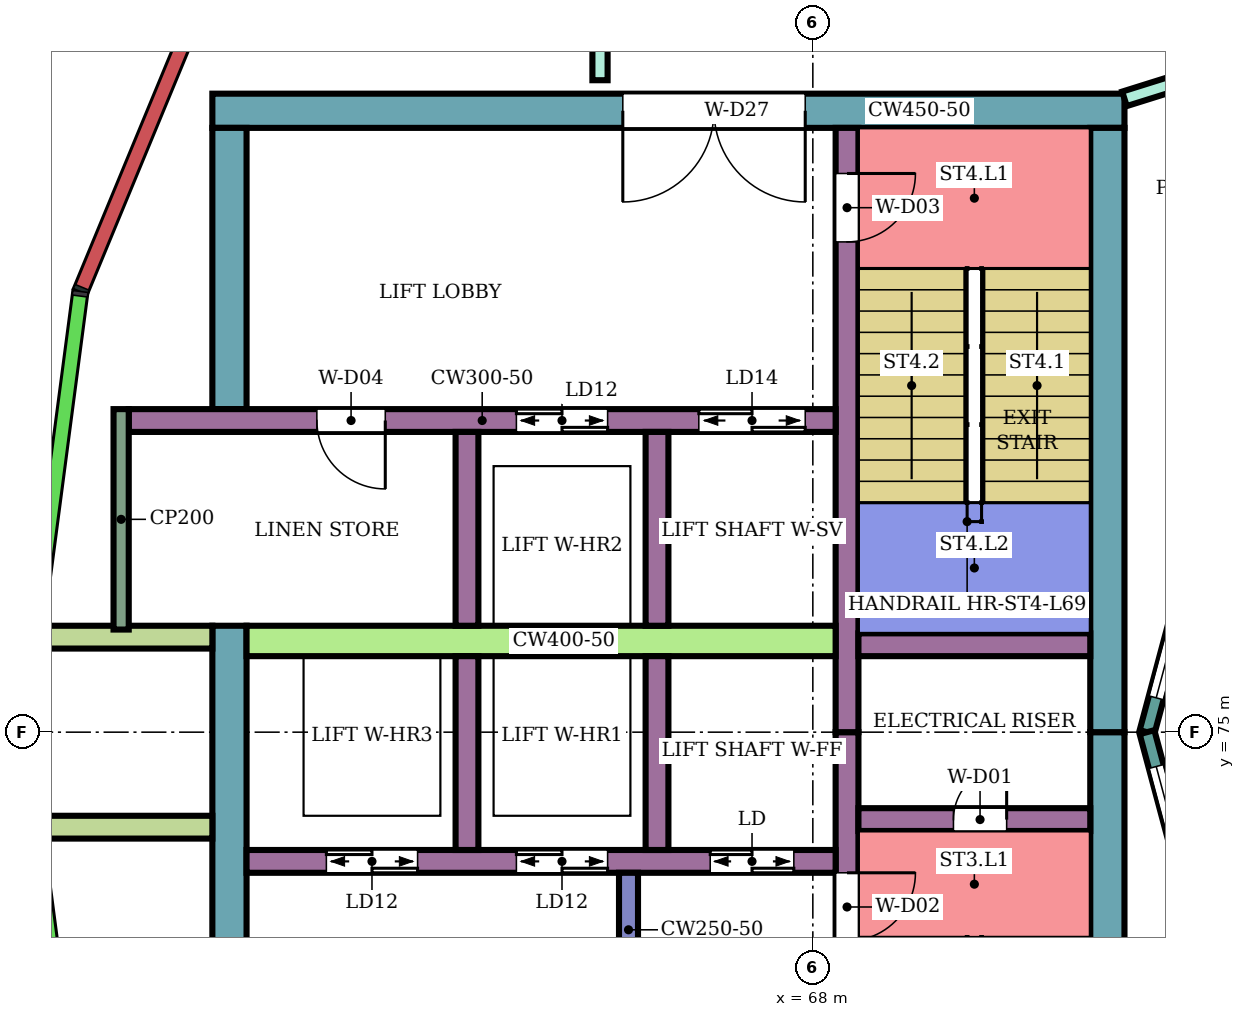
"""IFC4 building model, lengths in metres.
Left out: names, types, materials, properties, quantities, classifications, styles, units other than length and angle.
Written with IfcOpenShell. Run it as: python <this file> out.ifc"""

import sys

from ifc_helpers import new_model, si_unit, direction, frame, frame_2d, origin, place, context, subcontext, project, spatial, rectangle, extrude, element, fill, save


model = new_model("IFC4")
c1 = context("Model", 3, precision=1e-05, world=origin(), true_north=direction((0.0, 1.0)))
c2 = subcontext(c1, "Body", "Model", "MODEL_VIEW")
j1 = project(units=[si_unit("LENGTHUNIT", "METRE"), si_unit("PLANEANGLEUNIT", "RADIAN")], contexts=[c1])
p1 = place(None, origin())
s1 = spatial("IfcSite", under=j1, at=p1, CompositionType="ELEMENT")
p2 = place(p1, origin())
s2 = spatial("IfcBuilding", under=s1, at=p2, CompositionType="ELEMENT")
p3 = place(p2, frame((0.0, 0.0, 300.9)))
s3 = spatial("IfcBuildingStorey", under=s2, at=p3, CompositionType="ELEMENT", Elevation=300.9)
p4 = place(p3, frame((72.1, 83.175, 0.0), z_axis=(0.0, 0.0, 1.0), x_axis=(-1.0, 0.0, 0.0)))
e1 = element("IfcWall", 1, at=p4, inside=s3, PredefinedType="SHEAR", context=c2, shape_type="SweptSolid", body=[
    extrude(rectangle(XDim=12.0, YDim=0.45, at=frame_2d((6.0, 0.0))), origin(), (0.0, 0.0, 1.0), 3.88),
])
p5 = place(p4, frame((4.2, 0.0, 0.0)))
e2 = element("IfcOpeningElement", 2, at=p5, cuts=e1, PredefinedType="OPENING", context=c2, shape_type="SweptSolid", body=[
    extrude(rectangle(XDim=2.4, YDim=2.4, at=frame_2d((1.2, 1.2))), frame((0.0, 0.235, 0.0), z_axis=(0.0, -1.0, 0.0), x_axis=(1.0, 0.0, 0.0)), (0.0, 0.0, 1.0), 0.47),
])
for number, where, z_axis, x_axis in (
    (3, (71.875, 75.0, 0.0), (0.0, 0.0, 1.0), (0.0, -1.0, 0.0)),
    (4, (71.875, 82.95, 0.0), (0.0, 0.0, 1.0), (0.0, -1.0, 0.0)),
):
    element("IfcWall", number, at=place(p3, frame(where, z_axis=z_axis, x_axis=x_axis)), inside=s3, PredefinedType="SHEAR", context=c2, shape_type="SweptSolid", body=[
        extrude(rectangle(XDim=7.95, YDim=0.45, at=frame_2d((3.975, 0.0))), origin(), (0.0, 0.0, 1.0), 3.88),
    ])
p6 = place(p3, frame((60.325, 76.4, 0.0), z_axis=(0.0, 0.0, 1.0), x_axis=(0.0, -1.0, 0.0)))
e5 = element("IfcWall", 5, at=p6, inside=s3, PredefinedType="SHEAR", context=c2, shape_type="SweptSolid", body=[
    extrude(rectangle(XDim=9.35, YDim=0.45, at=frame_2d((4.675, 0.0))), origin(), (0.0, 0.0, 1.0), 3.88),
])
p7 = place(p3, frame((60.325, 82.95, 0.0), z_axis=(0.0, 0.0, 1.0), x_axis=(0.0, -1.0, 0.0)))
e6 = element("IfcWall", 6, at=p7, inside=s3, PredefinedType="SHEAR", context=c2, shape_type="SweptSolid", body=[
    extrude(rectangle(XDim=3.7, YDim=0.45, at=frame_2d((1.85, 0.0))), origin(), (0.0, 0.0, 1.0), 3.88),
])
p8 = place(p3, frame((68.45, 75.0, 0.0), z_axis=(0.0, 0.0, 1.0), x_axis=(0.0, -1.0, 0.0)))
e7 = element("IfcWall", 7, at=p8, inside=s3, PredefinedType="SHEAR", context=c2, shape_type="SweptSolid", body=[
    extrude(rectangle(XDim=7.95, YDim=0.3, at=frame_2d((3.975, 0.0))), origin(), (0.0, 0.0, 1.0), 3.88),
])
p9 = place(p8, frame((1.85, 0.0, 0.0)))
e8 = element("IfcOpeningElement", 8, at=p9, cuts=e7, PredefinedType="OPENING", context=c2, shape_type="SweptSolid", body=[
    extrude(rectangle(XDim=0.9, YDim=2.1, at=frame_2d((0.45, 1.05))), frame((0.0, 0.16, 0.0), z_axis=(0.0, -1.0, 0.0), x_axis=(1.0, 0.0, 0.0)), (0.0, 0.0, 1.0), 0.32),
])
p10 = place(p3, frame((68.45, 82.95, 0.0), z_axis=(0.0, 0.0, 1.0), x_axis=(0.0, -1.0, 0.0)))
e9 = element("IfcWall", 9, at=p10, inside=s3, PredefinedType="SHEAR", context=c2, shape_type="SweptSolid", body=[
    extrude(rectangle(XDim=7.95, YDim=0.3, at=frame_2d((3.975, 0.0))), origin(), (0.0, 0.0, 1.0), 3.88),
])
p11 = place(p10, frame((0.6, 0.0, 0.0)))
e10 = element("IfcOpeningElement", 10, at=p11, cuts=e9, PredefinedType="OPENING", context=c2, shape_type="SweptSolid", body=[
    extrude(rectangle(XDim=0.9, YDim=2.1, at=frame_2d((0.45, 1.05))), frame((0.0, 0.16, 0.0), z_axis=(0.0, -1.0, 0.0), x_axis=(1.0, 0.0, 0.0)), (0.0, 0.0, 1.0), 0.32),
])
p12 = place(p3, frame((71.65, 73.85, 0.0), z_axis=(0.0, 0.0, 1.0), x_axis=(-1.0, 0.0, 0.0)))
e11 = element("IfcWall", 11, at=p12, inside=s3, PredefinedType="SHEAR", context=c2, shape_type="SweptSolid", body=[
    extrude(rectangle(XDim=3.05, YDim=0.3, at=frame_2d((1.525, 0.0))), origin(), (0.0, 0.0, 1.0), 3.88),
])
p13 = place(p12, frame((1.1, 0.0, 0.0)))
e12 = element("IfcOpeningElement", 12, at=p13, cuts=e11, PredefinedType="OPENING", context=c2, shape_type="SweptSolid", body=[
    extrude(rectangle(XDim=0.7, YDim=2.0, at=frame_2d((0.35, 1.0))), frame((0.0, 0.16, 0.0), z_axis=(0.0, -1.0, 0.0), x_axis=(1.0, 0.0, 0.0)), (0.0, 0.0, 1.0), 0.32),
])
p14 = place(p3, frame((71.65, 76.15, 0.0), z_axis=(0.0, 0.0, 1.0), x_axis=(-1.0, 0.0, 0.0)))
e13 = element("IfcWall", 13, at=p14, inside=s3, PredefinedType="SHEAR", context=c2, shape_type="SweptSolid", body=[
    extrude(rectangle(XDim=3.05, YDim=0.3, at=frame_2d((1.525, 0.0))), origin(), (0.0, 0.0, 1.0), 3.88),
])
p15 = place(p3, frame((68.3, 73.3, 0.0), z_axis=(0.0, 0.0, 1.0), x_axis=(-1.0, 0.0, 0.0)))
e14 = element("IfcWall", 14, at=p15, inside=s3, PredefinedType="SHEAR", context=c2, shape_type="SweptSolid", body=[
    extrude(rectangle(XDim=7.75, YDim=0.3, at=frame_2d((3.875, 0.0))), origin(), (0.0, 0.0, 1.0), 3.88),
])
p16 = place(p15, frame((0.55, 0.0, 0.0)))
e15 = element("IfcOpeningElement", 15, at=p16, cuts=e14, PredefinedType="OPENING", context=c2, shape_type="SweptSolid", body=[
    extrude(rectangle(XDim=1.1, YDim=2.1, at=frame_2d((0.55, 1.05))), frame((0.0, 0.16, 0.0), z_axis=(0.0, -1.0, 0.0), x_axis=(1.0, 0.0, 0.0)), (0.0, 0.0, 1.0), 0.32),
])
p17 = place(p15, frame((3.0, 0.0, 0.0)))
e16 = element("IfcOpeningElement", 16, at=p17, cuts=e14, PredefinedType="OPENING", context=c2, shape_type="SweptSolid", body=[
    extrude(rectangle(XDim=1.2, YDim=2.1, at=frame_2d((0.6, 1.05))), frame((0.0, 0.16, 0.0), z_axis=(0.0, -1.0, 0.0), x_axis=(1.0, 0.0, 0.0)), (0.0, 0.0, 1.0), 0.32),
])
p18 = place(p15, frame((5.5, 0.0, 0.0)))
e17 = element("IfcOpeningElement", 17, at=p18, cuts=e14, PredefinedType="OPENING", context=c2, shape_type="SweptSolid", body=[
    extrude(rectangle(XDim=1.2, YDim=2.1, at=frame_2d((0.6, 1.05))), frame((0.0, 0.16, 0.0), z_axis=(0.0, -1.0, 0.0), x_axis=(1.0, 0.0, 0.0)), (0.0, 0.0, 1.0), 0.32),
])
p19 = place(p3, frame((68.3, 76.2, 0.0), z_axis=(0.0, 0.0, 1.0), x_axis=(-1.0, 0.0, 0.0)))
e18 = element("IfcWall", 18, at=p19, inside=s3, PredefinedType="SHEAR", context=c2, shape_type="SweptSolid", body=[
    extrude(rectangle(XDim=7.75, YDim=0.4, at=frame_2d((3.875, 0.0))), origin(), (0.0, 0.0, 1.0), 3.88),
])
p20 = place(p3, frame((68.3, 79.1, 0.0), z_axis=(0.0, 0.0, 1.0), x_axis=(-1.0, 0.0, 0.0)))
e19 = element("IfcWall", 19, at=p20, inside=s3, PredefinedType="SHEAR", context=c2, shape_type="SweptSolid", body=[
    extrude(rectangle(XDim=9.3, YDim=0.3, at=frame_2d((4.65, 0.0))), origin(), (0.0, 0.0, 1.0), 3.88),
])
p21 = place(p20, frame((0.4, 0.0, 0.0)))
e20 = element("IfcOpeningElement", 20, at=p21, cuts=e19, PredefinedType="OPENING", context=c2, shape_type="SweptSolid", body=[
    extrude(rectangle(XDim=1.4, YDim=2.1, at=frame_2d((0.7, 1.05))), frame((0.0, 0.16, 0.0), z_axis=(0.0, -1.0, 0.0), x_axis=(1.0, 0.0, 0.0)), (0.0, 0.0, 1.0), 0.32),
])
p22 = place(p20, frame((3.0, 0.0, 0.0)))
e21 = element("IfcOpeningElement", 21, at=p22, cuts=e19, PredefinedType="OPENING", context=c2, shape_type="SweptSolid", body=[
    extrude(rectangle(XDim=1.2, YDim=2.1, at=frame_2d((0.6, 1.05))), frame((0.0, 0.16, 0.0), z_axis=(0.0, -1.0, 0.0), x_axis=(1.0, 0.0, 0.0)), (0.0, 0.0, 1.0), 0.32),
])
p23 = place(p20, frame((5.925, 0.0, 0.0)))
e22 = element("IfcOpeningElement", 22, at=p23, cuts=e19, PredefinedType="OPENING", context=c2, shape_type="SweptSolid", body=[
    extrude(rectangle(XDim=0.9, YDim=2.1, at=frame_2d((0.45, 1.05))), frame((0.0, 0.16, 0.0), z_axis=(0.0, -1.0, 0.0), x_axis=(1.0, 0.0, 0.0)), (0.0, 0.0, 1.0), 0.32),
])
for number, where, z_axis, x_axis in (
    (23, (65.95, 76.0, 0.0), (0.0, 0.0, 1.0), (0.0, -1.0, 0.0)),
    (24, (63.45, 76.0, 0.0), (0.0, 0.0, 1.0), (0.0, -1.0, 0.0)),
    (25, (65.95, 78.95, 0.0), (0.0, 0.0, 1.0), (0.0, -1.0, 0.0)),
    (26, (63.45, 78.95, 0.0), (0.0, 0.0, 1.0), (0.0, -1.0, 0.0)),
):
    element("IfcWall", number, at=place(p3, frame(where, z_axis=z_axis, x_axis=x_axis)), inside=s3, PredefinedType="SHEAR", context=c2, shape_type="SweptSolid", body=[
        extrude(rectangle(XDim=2.55, YDim=0.3, at=frame_2d((1.275, 0.0))), origin(), (0.0, 0.0, 1.0), 3.88),
    ])
p24 = place(p3, frame((65.575, 73.15, 0.0), z_axis=(0.0, 0.0, 1.0), x_axis=(0.0, -1.0, 0.0)))
e27 = element("IfcWall", 27, at=p24, inside=s3, PredefinedType="SHEAR", context=c2, shape_type="SweptSolid", body=[
    extrude(rectangle(XDim=1.5, YDim=0.25, at=frame_2d((0.75, 0.0))), origin(), (0.0, 0.0, 1.0), 3.88),
])
for number, where, z_axis, x_axis in (
    (28, (60.1, 76.25, 0.0), (0.0, 0.0, 1.0), (-1.0, 0.0, 0.0)),
    (29, (60.1, 73.75, 0.0), (0.0, 0.0, 1.0), (-1.0, 0.0, 0.0)),
):
    element("IfcWall", number, at=place(p3, frame(where, z_axis=z_axis, x_axis=x_axis)), inside=s3, PredefinedType="NOTDEFINED", context=c2, shape_type="SweptSolid", body=[
        extrude(rectangle(XDim=2.416, YDim=0.3, at=frame_2d((1.208, 0.0))), origin(), (0.0, 0.0, 1.0), 4.2),
    ])
p25 = place(p3, frame((73.415, 78.802, 0.0), z_axis=(0.0, 0.0, 1.0), x_axis=(-0.258789828301, -0.965933654434, 0.0)))
e30 = element("IfcWall", 30, at=p25, inside=s3, PredefinedType="NOTDEFINED", context=c2, shape_type="SweptSolid", body=[
    extrude(rectangle(XDim=3.936, YDim=0.2, at=frame_2d((1.968, 0.0))), origin(), (0.0, 0.0, 1.0), 4.2),
])
p26 = place(p25, frame((0.468, 0.0, 0.9)))
e31 = element("IfcOpeningElement", 31, at=p26, cuts=e30, PredefinedType="OPENING", context=c2, shape_type="SweptSolid", body=[
    extrude(rectangle(XDim=3.0, YDim=2.3, at=frame_2d((1.5, 1.15))), frame((0.0, 0.11, 0.0), z_axis=(0.0, -1.0, 0.0), x_axis=(1.0, 0.0, 0.0)), (0.0, 0.0, 1.0), 0.22),
])
p27 = place(p3, frame((72.396, 75.0, 0.0), z_axis=(0.0, 0.0, 1.0), x_axis=(0.258789828301, -0.965933654434, 0.0)))
e32 = element("IfcWall", 32, at=p27, inside=s3, PredefinedType="NOTDEFINED", context=c2, shape_type="SweptSolid", body=[
    extrude(rectangle(XDim=3.936, YDim=0.2, at=frame_2d((1.968, 0.0))), origin(), (0.0, 0.0, 1.0), 4.2),
])
p28 = place(p27, frame((0.468, 0.0, 0.9)))
e33 = element("IfcOpeningElement", 33, at=p28, cuts=e32, PredefinedType="OPENING", context=c2, shape_type="SweptSolid", body=[
    extrude(rectangle(XDim=3.0, YDim=2.3, at=frame_2d((1.5, 1.15))), frame((0.0, 0.11, 0.0), z_axis=(0.0, -1.0, 0.0), x_axis=(1.0, 0.0, 0.0)), (0.0, 0.0, 1.0), 0.22),
])
p29 = place(p3, frame((65.2, 83.577, 0.0), z_axis=(0.0, 0.0, 1.0), x_axis=(0.0, 1.0, 0.0)))
e34 = element("IfcWall", 34, at=p29, inside=s3, PredefinedType="PARTITIONING", context=c2, shape_type="SweptSolid", body=[
    extrude(rectangle(XDim=1.223, YDim=0.2, at=frame_2d((0.612, 0.0))), origin(), (0.0, 0.0, 1.0), 3.75),
])
p30 = place(p3, frame((72.1, 83.332, 0.0), z_axis=(0.0, 0.0, 1.0), x_axis=(0.954233106619, 0.299063836383, 0.0)))
e35 = element("IfcWall", 35, at=p30, inside=s3, PredefinedType="PARTITIONING", context=c2, shape_type="SweptSolid", body=[
    extrude(rectangle(XDim=2.414, YDim=0.2, at=frame_2d((1.207, 0.0))), origin(), (0.0, 0.0, 1.0), 3.75),
])
p31 = place(p30, frame((0.762, 0.0, 0.0)))
e36 = element("IfcOpeningElement", 36, at=p31, cuts=e35, PredefinedType="OPENING", context=c2, shape_type="SweptSolid", body=[
    extrude(rectangle(XDim=0.9, YDim=2.1, at=frame_2d((0.45, 1.05))), frame((0.0, 0.11, 0.0), z_axis=(0.0, -1.0, 0.0), x_axis=(1.0, 0.0, 0.0)), (0.0, 0.0, 1.0), 0.22),
])
p32 = place(p3, frame((58.9, 79.25, 0.0), z_axis=(0.0, 0.0, 1.0), x_axis=(0.0, -1.0, 0.0)))
e37 = element("IfcWall", 37, at=p32, inside=s3, PredefinedType="PARTITIONING", context=c2, shape_type="SweptSolid", body=[
    extrude(rectangle(XDim=2.9, YDim=0.2, at=frame_2d((1.45, 0.0))), origin(), (0.0, 0.0, 1.0), 3.88),
])
p33 = place(p26, origin())
e38 = element("IfcWindow", 38, at=p33, inside=s3, PartitioningType="SINGLE_PANEL", PredefinedType="WINDOW", context=c2, shape_type="SweptSolid", body=[
    extrude(rectangle(XDim=3.0, YDim=2.3, at=frame_2d((1.5, 1.15))), frame((0.0, 0.03, 0.0), z_axis=(0.0, -1.0, 0.0), x_axis=(1.0, 0.0, 0.0)), (0.0, 0.0, 1.0), 0.06),
])
fill(e31, e38)
p34 = place(p28, origin())
e39 = element("IfcWindow", 39, at=p34, inside=s3, PartitioningType="SINGLE_PANEL", PredefinedType="WINDOW", context=c2, shape_type="SweptSolid", body=[
    extrude(rectangle(XDim=3.0, YDim=2.3, at=frame_2d((1.5, 1.15))), frame((0.0, 0.03, 0.0), z_axis=(0.0, -1.0, 0.0), x_axis=(1.0, 0.0, 0.0)), (0.0, 0.0, 1.0), 0.06),
])
fill(e33, e39)
p35 = place(p13, frame((0.7, 0.0, 0.0), z_axis=(0.0, 0.0, 1.0), x_axis=(-1.0, 0.0, 0.0)))
e40 = element("IfcDoor", 40, at=p35, inside=s3, OperationType="SINGLE_SWING_RIGHT", PredefinedType="DOOR", context=c2, shape_type="SweptSolid", body=[
    extrude(rectangle(XDim=0.7, YDim=2.0, at=frame_2d((0.35, 1.0))), frame((0.0, 0.025, 0.0), z_axis=(0.0, -1.0, 0.0), x_axis=(1.0, 0.0, 0.0)), (0.0, 0.0, 1.0), 0.05),
])
fill(e12, e40)
p36 = place(p9, origin())
e41 = element("IfcDoor", 41, at=p36, inside=s3, OperationType="SINGLE_SWING_LEFT", PredefinedType="DOOR", context=c2, shape_type="SweptSolid", body=[
    extrude(rectangle(XDim=0.9, YDim=2.1, at=frame_2d((0.45, 1.05))), frame((0.0, 0.025, 0.0), z_axis=(0.0, -1.0, 0.0), x_axis=(1.0, 0.0, 0.0)), (0.0, 0.0, 1.0), 0.05),
])
fill(e8, e41)
p37 = place(p11, origin())
e42 = element("IfcDoor", 42, at=p37, inside=s3, OperationType="SINGLE_SWING_LEFT", PredefinedType="DOOR", context=c2, shape_type="SweptSolid", body=[
    extrude(rectangle(XDim=0.9, YDim=2.1, at=frame_2d((0.45, 1.05))), frame((0.0, 0.025, 0.0), z_axis=(0.0, -1.0, 0.0), x_axis=(1.0, 0.0, 0.0)), (0.0, 0.0, 1.0), 0.05),
])
fill(e10, e42)
p38 = place(p16, origin())
e43 = element("IfcDoor", 43, at=p38, inside=s3, OperationType="DOUBLE_DOOR_SLIDING", PredefinedType="DOOR", context=c2, shape_type="SweptSolid", body=[
    extrude(rectangle(XDim=1.1, YDim=2.1, at=frame_2d((0.55, 1.05))), frame((0.0, 0.025, 0.0), z_axis=(0.0, -1.0, 0.0), x_axis=(1.0, 0.0, 0.0)), (0.0, 0.0, 1.0), 0.05),
])
fill(e15, e43)
p39 = place(p17, origin())
e44 = element("IfcDoor", 44, at=p39, inside=s3, OperationType="DOUBLE_DOOR_SLIDING", PredefinedType="DOOR", context=c2, shape_type="SweptSolid", body=[
    extrude(rectangle(XDim=1.2, YDim=2.1, at=frame_2d((0.6, 1.05))), frame((0.0, 0.025, 0.0), z_axis=(0.0, -1.0, 0.0), x_axis=(1.0, 0.0, 0.0)), (0.0, 0.0, 1.0), 0.05),
])
fill(e16, e44)
p40 = place(p18, origin())
e45 = element("IfcDoor", 45, at=p40, inside=s3, OperationType="DOUBLE_DOOR_SLIDING", PredefinedType="DOOR", context=c2, shape_type="SweptSolid", body=[
    extrude(rectangle(XDim=1.2, YDim=2.1, at=frame_2d((0.6, 1.05))), frame((0.0, 0.025, 0.0), z_axis=(0.0, -1.0, 0.0), x_axis=(1.0, 0.0, 0.0)), (0.0, 0.0, 1.0), 0.05),
])
fill(e17, e45)
p41 = place(p21, origin())
e46 = element("IfcDoor", 46, at=p41, inside=s3, OperationType="DOUBLE_DOOR_SLIDING", PredefinedType="DOOR", context=c2, shape_type="SweptSolid", body=[
    extrude(rectangle(XDim=1.4, YDim=2.1, at=frame_2d((0.7, 1.05))), frame((0.0, 0.025, 0.0), z_axis=(0.0, -1.0, 0.0), x_axis=(1.0, 0.0, 0.0)), (0.0, 0.0, 1.0), 0.05),
])
fill(e20, e46)
p42 = place(p22, origin())
e47 = element("IfcDoor", 47, at=p42, inside=s3, OperationType="DOUBLE_DOOR_SLIDING", PredefinedType="DOOR", context=c2, shape_type="SweptSolid", body=[
    extrude(rectangle(XDim=1.2, YDim=2.1, at=frame_2d((0.6, 1.05))), frame((0.0, 0.025, 0.0), z_axis=(0.0, -1.0, 0.0), x_axis=(1.0, 0.0, 0.0)), (0.0, 0.0, 1.0), 0.05),
])
fill(e21, e47)
p43 = place(p23, origin())
e48 = element("IfcDoor", 48, at=p43, inside=s3, OperationType="SINGLE_SWING_LEFT", PredefinedType="DOOR", context=c2, shape_type="SweptSolid", body=[
    extrude(rectangle(XDim=0.9, YDim=2.1, at=frame_2d((0.45, 1.05))), frame((0.0, 0.025, 0.0), z_axis=(0.0, -1.0, 0.0), x_axis=(1.0, 0.0, 0.0)), (0.0, 0.0, 1.0), 0.05),
])
fill(e22, e48)
p44 = place(p5, origin())
e49 = element("IfcDoor", 49, at=p44, inside=s3, OperationType="DOUBLE_DOOR_SINGLE_SWING", PredefinedType="DOOR", context=c2, shape_type="SweptSolid", body=[
    extrude(rectangle(XDim=2.4, YDim=2.4, at=frame_2d((1.2, 1.2))), frame((0.0, 0.025, 0.0), z_axis=(0.0, -1.0, 0.0), x_axis=(1.0, 0.0, 0.0)), (0.0, 0.0, 1.0), 0.05),
])
fill(e2, e49)
save(model, sys.argv[1])
